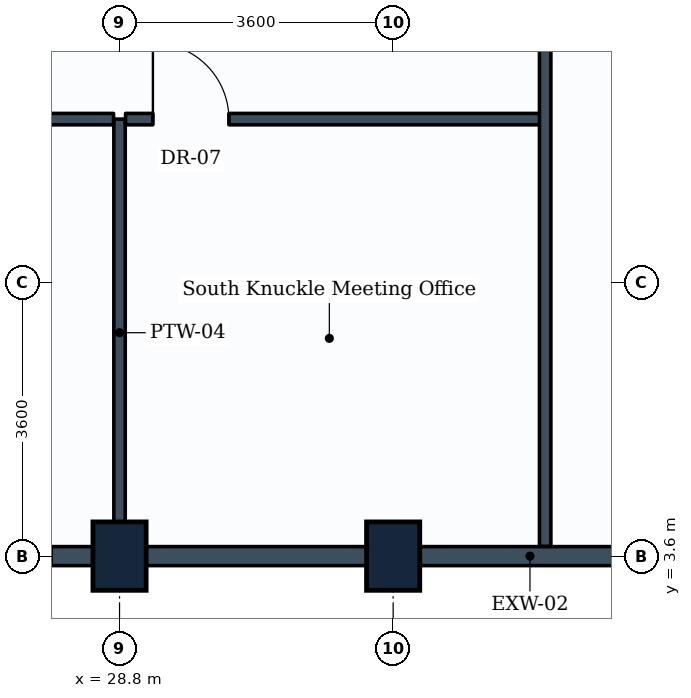
"""IFC4 building model, lengths in metres.
Left out: names, types, materials, properties, quantities, classifications, styles, units other than length and angle.
Written with IfcOpenShell. Run it as: python <this file> out.ifc"""

import sys

from ifc_helpers import new_model, si_unit, direction, frame, frame_2d, origin, origin_2d, place, context, subcontext, project, spatial, rectangle, extrude, element, fill, save


model = new_model("IFC4")
c1 = context("Model", 3, precision=1e-05, world=origin(), true_north=direction((0.0, 1.0)))
c2 = subcontext(c1, "Body", "Model", "MODEL_VIEW")
j1 = project(units=[si_unit("LENGTHUNIT", "METRE"), si_unit("PLANEANGLEUNIT", "RADIAN")], contexts=[c1])
p1 = place(None, origin())
s1 = spatial("IfcSite", under=j1, at=p1, CompositionType="ELEMENT")
p2 = place(p1, origin())
s2 = spatial("IfcBuilding", under=s1, at=p2, CompositionType="ELEMENT")
p3 = place(p2, frame((0.0, 0.0, 197.6)))
s3 = spatial("IfcBuildingStorey", under=s2, at=p3, CompositionType="ELEMENT", Elevation=197.6)
for number, where, z_axis, x_axis in (
    (1, (28.8, 3.6, 0.0), (0.0, 0.0, 1.0), (1.0, 0.0, 0.0)),
    (2, (32.4, 3.6, 0.0), (0.0, 0.0, 1.0), (1.0, 0.0, 0.0)),
):
    element("IfcColumn", number, at=place(p3, frame(where, z_axis=z_axis, x_axis=x_axis)), inside=s3, PredefinedType="COLUMN", context=c2, shape_type="SweptSolid", body=[
        extrude(rectangle(XDim=0.7, YDim=0.9, at=origin_2d()), origin(), (0.0, 0.0, 1.0), 3.8),
    ])
p4 = place(p3, frame((28.8, 3.6, 0.0), z_axis=(0.0, 0.0, 1.0), x_axis=(-1.0, 0.0, 0.0)))
e3 = element("IfcWall", 3, at=p4, inside=s3, PredefinedType="STANDARD", context=c2, shape_type="SweptSolid", body=[
    extrude(rectangle(XDim=3.6, YDim=0.25, at=frame_2d((1.8, 0.0))), origin(), (0.0, 0.0, 1.0), 2.93),
])
p5 = place(p4, frame((0.9, 0.0, 0.85)))
e4 = element("IfcOpeningElement", 4, at=p5, cuts=e3, PredefinedType="OPENING", context=c2, shape_type="SweptSolid", body=[
    extrude(rectangle(XDim=1.8, YDim=1.35, at=frame_2d((0.9, 0.675))), frame((0.0, 0.135, 0.0), z_axis=(0.0, -1.0, 0.0), x_axis=(1.0, 0.0, 0.0)), (0.0, 0.0, 1.0), 0.27),
])
p6 = place(p3, frame((32.4, 3.6, 0.0), z_axis=(0.0, 0.0, 1.0), x_axis=(-1.0, 0.0, 0.0)))
e5 = element("IfcWall", 5, at=p6, inside=s3, PredefinedType="STANDARD", context=c2, shape_type="SweptSolid", body=[
    extrude(rectangle(XDim=3.6, YDim=0.25, at=frame_2d((1.8, 0.0))), origin(), (0.0, 0.0, 1.0), 2.93),
])
p7 = place(p3, frame((36.0, 3.6, 0.0), z_axis=(0.0, 0.0, 1.0), x_axis=(-1.0, 0.0, 0.0)))
e6 = element("IfcWall", 6, at=p7, inside=s3, PredefinedType="STANDARD", context=c2, shape_type="SweptSolid", body=[
    extrude(rectangle(XDim=3.6, YDim=0.25, at=frame_2d((1.8, 0.0))), origin(), (0.0, 0.0, 1.0), 2.93),
])
p8 = place(p3, frame((28.8, 9.35, 0.0), z_axis=(0.0, 0.0, 1.0), x_axis=(0.0, -1.0, 0.0)))
e7 = element("IfcWall", 7, at=p8, inside=s3, PredefinedType="PARTITIONING", context=c2, shape_type="SweptSolid", body=[
    extrude(rectangle(XDim=5.621, YDim=0.15, at=frame_2d((2.811, 0.0))), origin(), (0.0, 0.0, 1.0), 3.535),
])
p9 = place(p3, frame((13.08, 9.35, 0.0), z_axis=(0.0, 0.0, 1.0), x_axis=(1.0, 0.0, 0.0)))
e8 = element("IfcWall", 8, at=p9, inside=s3, PredefinedType="PARTITIONING", context=c2, shape_type="SweptSolid", body=[
    extrude(rectangle(XDim=15.641, YDim=0.15, at=frame_2d((7.82, 0.0))), origin(), (0.0, 0.0, 1.0), 3.17),
])
p10 = place(p3, frame((28.879, 9.35, 0.0), z_axis=(0.0, 0.0, 1.0), x_axis=(1.0, 0.0, 0.0)))
e9 = element("IfcWall", 9, at=p10, inside=s3, PredefinedType="PARTITIONING", context=c2, shape_type="SweptSolid", body=[
    extrude(rectangle(XDim=5.521, YDim=0.15, at=frame_2d((2.76, 0.0))), origin(), (0.0, 0.0, 1.0), 3.535),
])
p11 = place(p10, frame((0.36, 0.0, 0.0)))
e10 = element("IfcOpeningElement", 10, at=p11, cuts=e9, PredefinedType="OPENING", context=c2, shape_type="SweptSolid", body=[
    extrude(rectangle(XDim=1.0, YDim=2.1, at=frame_2d((0.5, 1.05))), frame((0.0, 0.085, 0.0), z_axis=(0.0, -1.0, 0.0), x_axis=(1.0, 0.0, 0.0)), (0.0, 0.0, 1.0), 0.17),
])
p12 = place(p3, frame((34.4, 3.729, 0.0), z_axis=(0.0, 0.0, 1.0), x_axis=(0.0, 1.0, 0.0)))
e11 = element("IfcWall", 11, at=p12, inside=s3, PredefinedType="PARTITIONING", context=c2, shape_type="SweptSolid", body=[
    extrude(rectangle(XDim=14.121, YDim=0.15, at=frame_2d((7.061, 0.0))), origin(), (0.0, 0.0, 1.0), 2.93),
])
p13 = place(p11, origin())
e12 = element("IfcDoor", 12, at=p13, inside=s3, OperationType="SINGLE_SWING_LEFT", PredefinedType="DOOR", context=c2, shape_type="SweptSolid", body=[
    extrude(rectangle(XDim=1.0, YDim=2.1, at=frame_2d((0.5, 1.05))), frame((0.0, 0.025, 0.0), z_axis=(0.0, -1.0, 0.0), x_axis=(1.0, 0.0, 0.0)), (0.0, 0.0, 1.0), 0.05),
])
fill(e10, e12)
save(model, sys.argv[1])
